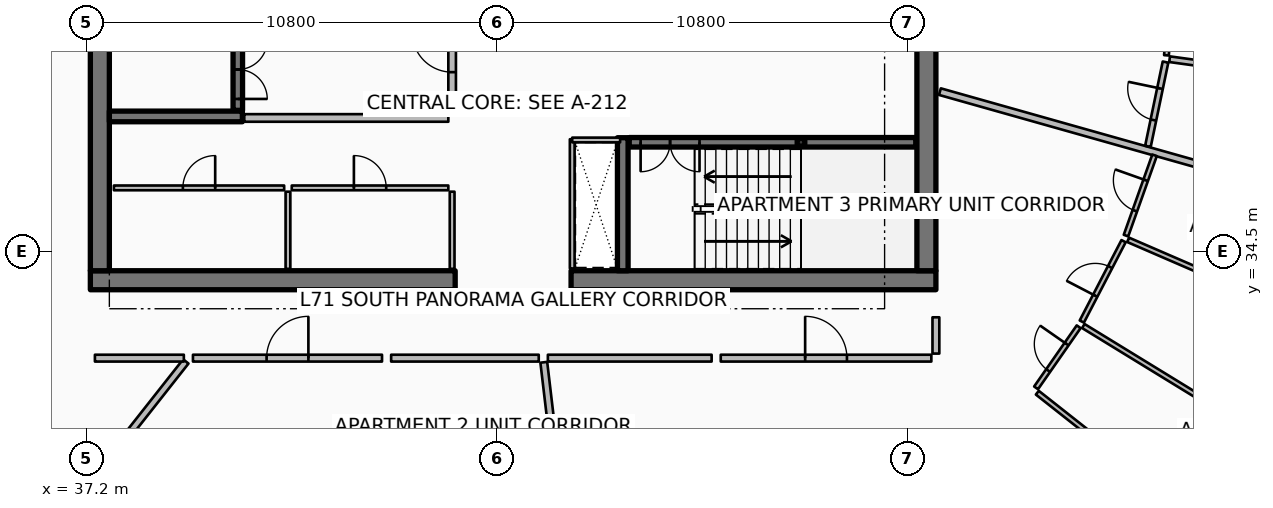
"""IFC4 building model, lengths in metres.
Left out: names, types, materials, properties, quantities, classifications, styles, units other than length and angle.
Written with IfcOpenShell. Run it as: python <this file> out.ifc"""

import sys

from ifc_helpers import new_model, si_unit, direction, frame, frame_2d, origin, origin_2d, place, context, subcontext, project, spatial, rectangle, hollow_rectangle, extrude, element, fill, save


model = new_model("IFC4")
c1 = context("Model", 3, precision=1e-05, world=origin(), true_north=direction((0.0, 1.0)))
c2 = subcontext(c1, "Body", "Model", "MODEL_VIEW")
j1 = project(units=[si_unit("LENGTHUNIT", "METRE"), si_unit("PLANEANGLEUNIT", "RADIAN")], contexts=[c1])
p1 = place(None, origin())
s1 = spatial("IfcSite", under=j1, at=p1, CompositionType="ELEMENT")
p2 = place(p1, origin())
s2 = spatial("IfcBuilding", under=s1, at=p2, CompositionType="ELEMENT")
p3 = place(p2, frame((0.0, 0.0, 282.9)))
s3 = spatial("IfcBuildingStorey", under=s2, at=p3, CompositionType="ELEMENT", Elevation=282.9)
p4 = place(p3, frame((37.3, 33.75, 0.0), z_axis=(0.0, 0.0, 1.0), x_axis=(1.0, 0.0, 0.0)))
e1 = element("IfcWall", 1, at=p4, inside=s3, PredefinedType="SHEAR", context=c2, shape_type="SweptSolid", body=[
    extrude(rectangle(XDim=9.6, YDim=0.5, at=frame_2d((4.8, 0.0))), origin(), (0.0, 0.0, 1.0), 3.85),
])
p5 = place(p3, frame((49.95, 33.75, 0.0), z_axis=(0.0, 0.0, 1.0), x_axis=(1.0, 0.0, 0.0)))
e2 = element("IfcWall", 2, at=p5, inside=s3, PredefinedType="SHEAR", context=c2, shape_type="SweptSolid", body=[
    extrude(rectangle(XDim=9.6, YDim=0.5, at=frame_2d((4.8, 0.0))), origin(), (0.0, 0.0, 1.0), 3.85),
])
for number, where, z_axis, x_axis in (
    (3, (37.55, 34.0, 0.0), (0.0, 0.0, 1.0), (0.0, 1.0, 0.0)),
    (4, (59.3, 34.0, 0.0), (0.0, 0.0, 1.0), (0.0, 1.0, 0.0)),
):
    element("IfcWall", number, at=place(p3, frame(where, z_axis=z_axis, x_axis=x_axis)), inside=s3, PredefinedType="SHEAR", context=c2, shape_type="SweptSolid", body=[
        extrude(rectangle(XDim=16.0, YDim=0.5, at=frame_2d((8.0, 0.0))), origin(), (0.0, 0.0, 1.0), 3.85),
    ])
for number, where, z_axis, x_axis in (
    (5, (37.8, 38.06, 0.0), (0.0, 0.0, 1.0), (1.0, 0.0, 0.0)),
    (6, (51.31, 34.0, 0.0), (0.0, 0.0, 1.0), (0.0, 1.0, 0.0)),
):
    element("IfcWall", number, at=place(p3, frame(where, z_axis=z_axis, x_axis=x_axis)), inside=s3, PredefinedType="SHEAR", context=c2, shape_type="SweptSolid", body=[
        extrude(rectangle(XDim=3.5, YDim=0.28, at=frame_2d((1.75, 0.0))), origin(), (0.0, 0.0, 1.0), 3.85),
    ])
p6 = place(p3, frame((56.0, 37.38, 0.0), z_axis=(0.0, 0.0, 1.0), x_axis=(1.0, 0.0, 0.0)))
e7 = element("IfcColumn", 7, at=p6, inside=s3, PredefinedType="COLUMN", context=c2, shape_type="SweptSolid", body=[
    extrude(hollow_rectangle(XDim=0.2, YDim=0.2, WallThickness=0.01, InnerFilletRadius=0.01, OuterFilletRadius=0.02, at=origin_2d()), origin(), (0.0, 0.0, 1.0), 1.72),
])
p7 = place(p3, frame((41.18, 38.22, 0.0), z_axis=(0.0, 0.0, 1.0), x_axis=(0.0, 1.0, 0.0)))
e8 = element("IfcWall", 8, at=p7, inside=s3, PredefinedType="SOLIDWALL", context=c2, shape_type="SweptSolid", body=[
    extrude(rectangle(XDim=7.56, YDim=0.25, at=frame_2d((3.78, 0.0))), origin(), (0.0, 0.0, 1.0), 3.59),
])
p8 = place(p7, frame((0.3, 0.0, 0.0)))
e9 = element("IfcOpeningElement", 9, at=p8, cuts=e8, PredefinedType="OPENING", context=c2, shape_type="SweptSolid", body=[
    extrude(rectangle(XDim=1.55, YDim=2.15, at=frame_2d((0.775, 1.075))), frame((0.0, 0.135, 0.0), z_axis=(0.0, -1.0, 0.0), x_axis=(1.0, 0.0, 0.0)), (0.0, 0.0, 1.0), 0.27),
])
p9 = place(p3, frame((51.48, 37.38, 0.0), z_axis=(0.0, 0.0, 1.0), x_axis=(1.0, 0.0, 0.0)))
e10 = element("IfcWall", 10, at=p9, inside=s3, PredefinedType="SOLIDWALL", context=c2, shape_type="SweptSolid", body=[
    extrude(rectangle(XDim=7.54, YDim=0.25, at=frame_2d((3.77, 0.0))), origin(), (0.0, 0.0, 1.0), 3.59),
])
p10 = place(p9, frame((0.3, 0.0, 0.0)))
e11 = element("IfcOpeningElement", 11, at=p10, cuts=e10, PredefinedType="OPENING", context=c2, shape_type="SweptSolid", body=[
    extrude(rectangle(XDim=1.55, YDim=2.15, at=frame_2d((0.775, 1.075))), frame((0.0, 0.135, 0.0), z_axis=(0.0, -1.0, 0.0), x_axis=(1.0, 0.0, 0.0)), (0.0, 0.0, 1.0), 0.27),
])
for number, where, z_axis, x_axis in (
    (12, (46.82, 34.05, 0.0), (0.0, 0.0, 1.0), (0.0, 1.0, 0.0)),
    (13, (42.5, 34.05, 0.0), (0.0, 0.0, 1.0), (0.0, 1.0, 0.0)),
):
    element("IfcWall", number, at=place(p3, frame(where, z_axis=z_axis, x_axis=x_axis)), inside=s3, PredefinedType="PARTITIONING", context=c2, shape_type="SweptSolid", body=[
        extrude(rectangle(XDim=2.03, YDim=0.125, at=frame_2d((1.015, 0.0))), origin(), (0.0, 0.0, 1.0), 3.03),
    ])
p11 = place(p3, frame((37.92, 36.18, 0.0), z_axis=(0.0, 0.0, 1.0), x_axis=(1.0, 0.0, 0.0)))
e14 = element("IfcWall", 14, at=p11, inside=s3, PredefinedType="PARTITIONING", context=c2, shape_type="SweptSolid", body=[
    extrude(rectangle(XDim=4.48, YDim=0.125, at=frame_2d((2.24, 0.0))), origin(), (0.0, 0.0, 1.0), 3.03),
])
p12 = place(p11, frame((1.815, 0.0, 0.0)))
e15 = element("IfcOpeningElement", 15, at=p12, cuts=e14, PredefinedType="OPENING", context=c2, shape_type="SweptSolid", body=[
    extrude(rectangle(XDim=0.85, YDim=2.06, at=frame_2d((0.425, 1.03))), frame((0.0, 0.073, 0.0), z_axis=(0.0, -1.0, 0.0), x_axis=(1.0, 0.0, 0.0)), (0.0, 0.0, 1.0), 0.145),
])
p13 = place(p3, frame((42.6, 36.18, 0.0), z_axis=(0.0, 0.0, 1.0), x_axis=(1.0, 0.0, 0.0)))
e16 = element("IfcWall", 16, at=p13, inside=s3, PredefinedType="PARTITIONING", context=c2, shape_type="SweptSolid", body=[
    extrude(rectangle(XDim=4.12, YDim=0.125, at=frame_2d((2.06, 0.0))), origin(), (0.0, 0.0, 1.0), 3.03),
])
p14 = place(p13, frame((1.635, 0.0, 0.0)))
e17 = element("IfcOpeningElement", 17, at=p14, cuts=e16, PredefinedType="OPENING", context=c2, shape_type="SweptSolid", body=[
    extrude(rectangle(XDim=0.85, YDim=2.06, at=frame_2d((0.425, 1.03))), frame((0.0, 0.073, 0.0), z_axis=(0.0, -1.0, 0.0), x_axis=(1.0, 0.0, 0.0)), (0.0, 0.0, 1.0), 0.145),
])
p15 = place(p3, frame((41.35, 38.02, 0.0), z_axis=(0.0, 0.0, 1.0), x_axis=(1.0, 0.0, 0.0)))
e18 = element("IfcWall", 18, at=p15, inside=s3, PredefinedType="PARTITIONING", context=c2, shape_type="SweptSolid", body=[
    extrude(rectangle(XDim=5.37, YDim=0.2, at=frame_2d((2.685, 0.0))), origin(), (0.0, 0.0, 1.0), 3.59),
])
p16 = place(p3, frame((46.82, 38.12, 0.0), z_axis=(0.0, 0.0, 1.0), x_axis=(0.0, 1.0, 0.0)))
e19 = element("IfcWall", 19, at=p16, inside=s3, PredefinedType="PARTITIONING", context=c2, shape_type="SweptSolid", body=[
    extrude(rectangle(XDim=3.26, YDim=0.2, at=frame_2d((1.63, 0.0))), origin(), (0.0, 0.0, 1.0), 3.59),
])
p17 = place(p16, frame((1.105, 0.0, 0.0)))
e20 = element("IfcOpeningElement", 20, at=p17, cuts=e19, PredefinedType="OPENING", context=c2, shape_type="SweptSolid", body=[
    extrude(rectangle(XDim=1.05, YDim=2.1, at=frame_2d((0.525, 1.05))), frame((0.0, 0.11, 0.0), z_axis=(0.0, -1.0, 0.0), x_axis=(1.0, 0.0, 0.0)), (0.0, 0.0, 1.0), 0.22),
])
p18 = place(p3, frame((49.98, 34.06, 0.0), z_axis=(0.0, 0.0, 1.0), x_axis=(0.0, 1.0, 0.0)))
e21 = element("IfcWall", 21, at=p18, inside=s3, PredefinedType="PARTITIONING", context=c2, shape_type="SweptSolid", body=[
    extrude(rectangle(XDim=3.4, YDim=0.125, at=frame_2d((1.7, 0.0))), origin(), (0.0, 0.0, 1.0), 3.03),
])
p19 = place(p3, frame((49.98, 37.44, 0.0), z_axis=(0.0, 0.0, 1.0), x_axis=(1.0, 0.0, 0.0)))
e22 = element("IfcWall", 22, at=p19, inside=s3, PredefinedType="PARTITIONING", context=c2, shape_type="SweptSolid", body=[
    extrude(rectangle(XDim=1.26, YDim=0.125, at=frame_2d((0.63, 0.0))), origin(), (0.0, 0.0, 1.0), 3.03),
])
p20 = place(p3, frame((39.812, 31.614, 0.0), z_axis=(0.0, 0.0, 1.0), x_axis=(-0.619097230176, -0.785314344443, 0.0)))
e23 = element("IfcWall", 23, at=p20, inside=s3, PredefinedType="PARTITIONING", context=c2, shape_type="SweptSolid", body=[
    extrude(rectangle(XDim=16.37, YDim=0.18, at=frame_2d((8.185, 0.0))), origin(), (0.0, 0.0, 1.0), 2.957),
])
p21 = place(p3, frame((49.232, 31.591, 0.0), z_axis=(0.0, 0.0, 1.0), x_axis=(0.117545848714, -0.993067456646, 0.0)))
e24 = element("IfcWall", 24, at=p21, inside=s3, PredefinedType="PARTITIONING", context=c2, shape_type="SweptSolid", body=[
    extrude(rectangle(XDim=14.213, YDim=0.18, at=frame_2d((7.106, 0.0))), origin(), (0.0, 0.0, 1.0), 2.957),
])
p22 = place(p3, frame((59.656, 38.713, 0.0), z_axis=(0.0, 0.0, 1.0), x_axis=(0.962454756022, -0.27144215334, 0.0)))
e25 = element("IfcWall", 25, at=p22, inside=s3, PredefinedType="PARTITIONING", context=c2, shape_type="SweptSolid", body=[
    extrude(rectangle(XDim=17.385, YDim=0.18, at=frame_2d((8.692, 0.0))), origin(), (0.0, 0.0, 1.0), 2.957),
])
p23 = place(p3, frame((37.42, 31.7, 0.0), z_axis=(0.0, 0.0, 1.0), x_axis=(1.0, 0.0, 0.0)))
e26 = element("IfcWall", 26, at=p23, inside=s3, PredefinedType="PARTITIONING", context=c2, shape_type="SweptSolid", body=[
    extrude(rectangle(XDim=2.34, YDim=0.18, at=frame_2d((1.17, 0.0))), origin(), (0.0, 0.0, 1.0), 2.957),
])
p24 = place(p3, frame((40.0, 31.7, 0.0), z_axis=(0.0, 0.0, 1.0), x_axis=(1.0, 0.0, 0.0)))
e27 = element("IfcWall", 27, at=p24, inside=s3, PredefinedType="PARTITIONING", context=c2, shape_type="SweptSolid", body=[
    extrude(rectangle(XDim=4.975, YDim=0.18, at=frame_2d((2.488, 0.0))), origin(), (0.0, 0.0, 1.0), 2.957),
])
p25 = place(p24, frame((1.938, 0.0, 0.0)))
e28 = element("IfcOpeningElement", 28, at=p25, cuts=e27, PredefinedType="OPENING", context=c2, shape_type="SweptSolid", body=[
    extrude(rectangle(XDim=1.1, YDim=2.1, at=frame_2d((0.55, 1.05))), frame((0.0, 0.1, 0.0), z_axis=(0.0, -1.0, 0.0), x_axis=(1.0, 0.0, 0.0)), (0.0, 0.0, 1.0), 0.2),
])
p26 = place(p3, frame((45.215, 31.7, 0.0), z_axis=(0.0, 0.0, 1.0), x_axis=(1.0, 0.0, 0.0)))
e29 = element("IfcWall", 29, at=p26, inside=s3, PredefinedType="PARTITIONING", context=c2, shape_type="SweptSolid", body=[
    extrude(rectangle(XDim=3.884, YDim=0.18, at=frame_2d((1.942, 0.0))), origin(), (0.0, 0.0, 1.0), 2.957),
])
p27 = place(p3, frame((53.888, 31.7, 0.0), z_axis=(0.0, 0.0, 1.0), x_axis=(1.0, 0.0, 0.0)))
e30 = element("IfcWall", 30, at=p27, inside=s3, PredefinedType="PARTITIONING", context=c2, shape_type="SweptSolid", body=[
    extrude(rectangle(XDim=5.542, YDim=0.18, at=frame_2d((2.771, 0.0))), origin(), (0.0, 0.0, 1.0), 2.957),
])
p28 = place(p27, frame((2.221, 0.0, 0.0)))
e31 = element("IfcOpeningElement", 31, at=p28, cuts=e30, PredefinedType="OPENING", context=c2, shape_type="SweptSolid", body=[
    extrude(rectangle(XDim=1.1, YDim=2.1, at=frame_2d((0.55, 1.05))), frame((0.0, 0.1, 0.0), z_axis=(0.0, -1.0, 0.0), x_axis=(1.0, 0.0, 0.0)), (0.0, 0.0, 1.0), 0.2),
])
p29 = place(p3, frame((59.55, 31.82, 0.0), z_axis=(0.0, 0.0, 1.0), x_axis=(0.0, 1.0, 0.0)))
e32 = element("IfcWall", 32, at=p29, inside=s3, PredefinedType="PARTITIONING", context=c2, shape_type="SweptSolid", body=[
    extrude(rectangle(XDim=0.955, YDim=0.18, at=frame_2d((0.477, 0.0))), origin(), (0.0, 0.0, 1.0), 2.957),
])
p30 = place(p3, frame((49.339, 31.7, 0.0), z_axis=(0.0, 0.0, 1.0), x_axis=(1.0, 0.0, 0.0)))
e33 = element("IfcWall", 33, at=p30, inside=s3, PredefinedType="PARTITIONING", context=c2, shape_type="SweptSolid", body=[
    extrude(rectangle(XDim=4.309, YDim=0.18, at=frame_2d((2.155, 0.0))), origin(), (0.0, 0.0, 1.0), 2.957),
])
p31 = place(p3, frame((62.219, 30.791, 0.0), z_axis=(0.0, 0.0, 1.0), x_axis=(0.785316198055, -0.619094878893, 0.0)))
e34 = element("IfcWall", 34, at=p31, inside=s3, PredefinedType="PARTITIONING", context=c2, shape_type="SweptSolid", body=[
    extrude(rectangle(XDim=8.979, YDim=0.125, at=frame_2d((4.489, 0.0))), origin(), (0.0, 0.0, 1.0), 2.957),
])
p32 = place(p3, frame((63.429, 32.545, 0.0), z_axis=(0.0, 0.0, 1.0), x_axis=(0.852634226121, -0.522508254907, 0.0)))
e35 = element("IfcWall", 35, at=p32, inside=s3, PredefinedType="PARTITIONING", context=c2, shape_type="SweptSolid", body=[
    extrude(rectangle(XDim=9.151, YDim=0.125, at=frame_2d((4.576, 0.0))), origin(), (0.0, 0.0, 1.0), 3.03),
])
p33 = place(p3, frame((64.608, 34.813, 0.0), z_axis=(0.0, 0.0, 1.0), x_axis=(0.917754543675, -0.397148080146, 0.0)))
e36 = element("IfcWall", 36, at=p33, inside=s3, PredefinedType="PARTITIONING", context=c2, shape_type="SweptSolid", body=[
    extrude(rectangle(XDim=9.994, YDim=0.125, at=frame_2d((4.997, 0.0))), origin(), (0.0, 0.0, 1.0), 3.03),
])
p34 = place(p3, frame((62.186, 30.918, 0.0), z_axis=(0.0, 0.0, 1.0), x_axis=(0.571797742108, 0.820394625848, 0.0)))
e37 = element("IfcWall", 37, at=p34, inside=s3, PredefinedType="PARTITIONING", context=c2, shape_type="SweptSolid", body=[
    extrude(rectangle(XDim=1.96, YDim=0.125, at=frame_2d((0.98, 0.0))), origin(), (0.0, 0.0, 1.0), 2.957),
])
p35 = place(p34, frame((0.555, 0.0, 0.0)))
e38 = element("IfcOpeningElement", 38, at=p35, cuts=e37, PredefinedType="OPENING", context=c2, shape_type="SweptSolid", body=[
    extrude(rectangle(XDim=0.85, YDim=2.06, at=frame_2d((0.425, 1.03))), frame((0.0, 0.073, 0.0), z_axis=(0.0, -1.0, 0.0), x_axis=(1.0, 0.0, 0.0)), (0.0, 0.0, 1.0), 0.145),
])
p36 = place(p3, frame((63.389, 32.663, 0.0), z_axis=(0.0, 0.0, 1.0), x_axis=(0.461007635573, 0.887396168542, 0.0)))
e39 = element("IfcWall", 39, at=p36, inside=s3, PredefinedType="PARTITIONING", context=c2, shape_type="SweptSolid", body=[
    extrude(rectangle(XDim=2.384, YDim=0.125, at=frame_2d((1.192, 0.0))), origin(), (0.0, 0.0, 1.0), 3.03),
])
p37 = place(p36, frame((0.767, 0.0, 0.0)))
e40 = element("IfcOpeningElement", 40, at=p37, cuts=e39, PredefinedType="OPENING", context=c2, shape_type="SweptSolid", body=[
    extrude(rectangle(XDim=0.85, YDim=2.06, at=frame_2d((0.425, 1.03))), frame((0.0, 0.073, 0.0), z_axis=(0.0, -1.0, 0.0), x_axis=(1.0, 0.0, 0.0)), (0.0, 0.0, 1.0), 0.145),
])
p38 = place(p3, frame((64.552, 34.924, 0.0), z_axis=(0.0, 0.0, 1.0), x_axis=(0.335011815583, 0.942213926569, 0.0)))
e41 = element("IfcWall", 41, at=p38, inside=s3, PredefinedType="PARTITIONING", context=c2, shape_type="SweptSolid", body=[
    extrude(rectangle(XDim=2.242, YDim=0.125, at=frame_2d((1.121, 0.0))), origin(), (0.0, 0.0, 1.0), 2.957),
])
p39 = place(p38, frame((0.696, 0.0, 0.0)))
e42 = element("IfcOpeningElement", 42, at=p39, cuts=e41, PredefinedType="OPENING", context=c2, shape_type="SweptSolid", body=[
    extrude(rectangle(XDim=0.85, YDim=2.06, at=frame_2d((0.425, 1.03))), frame((0.0, 0.073, 0.0), z_axis=(0.0, -1.0, 0.0), x_axis=(1.0, 0.0, 0.0)), (0.0, 0.0, 1.0), 0.145),
])
p40 = place(p3, frame((65.129, 37.273, 0.0), z_axis=(0.0, 0.0, 1.0), x_axis=(0.204337271361, 0.978900546293, 0.0)))
e43 = element("IfcWall", 43, at=p40, inside=s3, PredefinedType="PARTITIONING", context=c2, shape_type="SweptSolid", body=[
    extrude(rectangle(XDim=2.265, YDim=0.15, at=frame_2d((1.133, 0.0))), origin(), (0.0, 0.0, 1.0), 2.957),
])
p41 = place(p40, frame((0.708, 0.0, 0.0)))
e44 = element("IfcOpeningElement", 44, at=p41, cuts=e43, PredefinedType="OPENING", context=c2, shape_type="SweptSolid", body=[
    extrude(rectangle(XDim=0.85, YDim=2.06, at=frame_2d((0.425, 1.03))), frame((0.0, 0.085, 0.0), z_axis=(0.0, -1.0, 0.0), x_axis=(1.0, 0.0, 0.0)), (0.0, 0.0, 1.0), 0.17),
])
p42 = place(p3, frame((65.699, 39.566, 0.0), z_axis=(0.0, 0.0, 1.0), x_axis=(0.990678437061, -0.136221269786, 0.0)))
e45 = element("IfcWall", 45, at=p42, inside=s3, PredefinedType="PARTITIONING", context=c2, shape_type="SweptSolid", body=[
    extrude(rectangle(XDim=4.09, YDim=0.15, at=frame_2d((2.045, 0.0))), origin(), (0.0, 0.0, 1.0), 3.03),
])
p43 = place(p3, frame((65.617, 39.668, 0.0), z_axis=(0.0, 0.0, 1.0), x_axis=(0.072890621107, 0.99733994072, 0.0)))
e46 = element("IfcWall", 46, at=p43, inside=s3, PredefinedType="PARTITIONING", context=c2, shape_type="SweptSolid", body=[
    extrude(rectangle(XDim=2.09, YDim=0.125, at=frame_2d((1.045, 0.0))), origin(), (0.0, 0.0, 1.0), 3.03),
])
p44 = place(p43, frame((0.62, 0.0, 0.0)))
e47 = element("IfcOpeningElement", 47, at=p44, cuts=e46, PredefinedType="OPENING", context=c2, shape_type="SweptSolid", body=[
    extrude(rectangle(XDim=0.85, YDim=2.06, at=frame_2d((0.425, 1.03))), frame((0.0, 0.073, 0.0), z_axis=(0.0, -1.0, 0.0), x_axis=(1.0, 0.0, 0.0)), (0.0, 0.0, 1.0), 0.145),
])
p45 = place(p8, origin())
e48 = element("IfcDoor", 48, at=p45, inside=s3, OperationType="DOUBLE_DOOR_SINGLE_SWING", PredefinedType="DOOR", context=c2, shape_type="SweptSolid", body=[
    extrude(rectangle(XDim=1.55, YDim=2.15, at=frame_2d((0.775, 1.075))), frame((0.0, 0.025, 0.0), z_axis=(0.0, -1.0, 0.0), x_axis=(1.0, 0.0, 0.0)), (0.0, 0.0, 1.0), 0.05),
])
fill(e9, e48)
p46 = place(p10, origin())
e49 = element("IfcDoor", 49, at=p46, inside=s3, OperationType="DOUBLE_DOOR_SINGLE_SWING", PredefinedType="DOOR", context=c2, shape_type="SweptSolid", body=[
    extrude(rectangle(XDim=1.55, YDim=2.15, at=frame_2d((0.775, 1.075))), frame((0.0, 0.025, 0.0), z_axis=(0.0, -1.0, 0.0), x_axis=(1.0, 0.0, 0.0)), (0.0, 0.0, 1.0), 0.05),
])
fill(e11, e49)
p47 = place(p12, origin())
e50 = element("IfcDoor", 50, at=p47, inside=s3, OperationType="SINGLE_SWING_RIGHT", PredefinedType="DOOR", context=c2, shape_type="SweptSolid", body=[
    extrude(rectangle(XDim=0.85, YDim=2.06, at=frame_2d((0.425, 1.03))), frame((0.0, 0.025, 0.0), z_axis=(0.0, -1.0, 0.0), x_axis=(1.0, 0.0, 0.0)), (0.0, 0.0, 1.0), 0.05),
])
fill(e15, e50)
p48 = place(p14, origin())
e51 = element("IfcDoor", 51, at=p48, inside=s3, OperationType="SINGLE_SWING_LEFT", PredefinedType="DOOR", context=c2, shape_type="SweptSolid", body=[
    extrude(rectangle(XDim=0.85, YDim=2.06, at=frame_2d((0.425, 1.03))), frame((0.0, 0.025, 0.0), z_axis=(0.0, -1.0, 0.0), x_axis=(1.0, 0.0, 0.0)), (0.0, 0.0, 1.0), 0.05),
])
fill(e17, e51)
p49 = place(p17, origin())
e52 = element("IfcDoor", 52, at=p49, inside=s3, OperationType="SINGLE_SWING_RIGHT", PredefinedType="DOOR", context=c2, shape_type="SweptSolid", body=[
    extrude(rectangle(XDim=1.05, YDim=2.1, at=frame_2d((0.525, 1.05))), frame((0.0, 0.025, 0.0), z_axis=(0.0, -1.0, 0.0), x_axis=(1.0, 0.0, 0.0)), (0.0, 0.0, 1.0), 0.05),
])
fill(e20, e52)
p50 = place(p25, origin())
e53 = element("IfcDoor", 53, at=p50, inside=s3, OperationType="SINGLE_SWING_RIGHT", PredefinedType="DOOR", context=c2, shape_type="SweptSolid", body=[
    extrude(rectangle(XDim=1.1, YDim=2.1, at=frame_2d((0.55, 1.05))), frame((0.0, 0.025, 0.0), z_axis=(0.0, -1.0, 0.0), x_axis=(1.0, 0.0, 0.0)), (0.0, 0.0, 1.0), 0.05),
])
fill(e28, e53)
p51 = place(p28, origin())
e54 = element("IfcDoor", 54, at=p51, inside=s3, OperationType="SINGLE_SWING_LEFT", PredefinedType="DOOR", context=c2, shape_type="SweptSolid", body=[
    extrude(rectangle(XDim=1.1, YDim=2.1, at=frame_2d((0.55, 1.05))), frame((0.0, 0.025, 0.0), z_axis=(0.0, -1.0, 0.0), x_axis=(1.0, 0.0, 0.0)), (0.0, 0.0, 1.0), 0.05),
])
fill(e31, e54)
p52 = place(p35, origin())
e55 = element("IfcDoor", 55, at=p52, inside=s3, OperationType="SINGLE_SWING_RIGHT", PredefinedType="DOOR", context=c2, shape_type="SweptSolid", body=[
    extrude(rectangle(XDim=0.85, YDim=2.06, at=frame_2d((0.425, 1.03))), frame((0.0, 0.025, 0.0), z_axis=(0.0, -1.0, 0.0), x_axis=(1.0, 0.0, 0.0)), (0.0, 0.0, 1.0), 0.05),
])
fill(e38, e55)
p53 = place(p37, origin())
e56 = element("IfcDoor", 56, at=p53, inside=s3, OperationType="SINGLE_SWING_LEFT", PredefinedType="DOOR", context=c2, shape_type="SweptSolid", body=[
    extrude(rectangle(XDim=0.85, YDim=2.06, at=frame_2d((0.425, 1.03))), frame((0.0, 0.025, 0.0), z_axis=(0.0, -1.0, 0.0), x_axis=(1.0, 0.0, 0.0)), (0.0, 0.0, 1.0), 0.05),
])
fill(e40, e56)
p54 = place(p39, origin())
e57 = element("IfcDoor", 57, at=p54, inside=s3, OperationType="SINGLE_SWING_RIGHT", PredefinedType="DOOR", context=c2, shape_type="SweptSolid", body=[
    extrude(rectangle(XDim=0.85, YDim=2.06, at=frame_2d((0.425, 1.03))), frame((0.0, 0.025, 0.0), z_axis=(0.0, -1.0, 0.0), x_axis=(1.0, 0.0, 0.0)), (0.0, 0.0, 1.0), 0.05),
])
fill(e42, e57)
p55 = place(p41, origin())
e58 = element("IfcDoor", 58, at=p55, inside=s3, OperationType="SINGLE_SWING_RIGHT", PredefinedType="DOOR", context=c2, shape_type="SweptSolid", body=[
    extrude(rectangle(XDim=0.85, YDim=2.06, at=frame_2d((0.425, 1.03))), frame((0.0, 0.025, 0.0), z_axis=(0.0, -1.0, 0.0), x_axis=(1.0, 0.0, 0.0)), (0.0, 0.0, 1.0), 0.05),
])
fill(e44, e58)
save(model, sys.argv[1])
